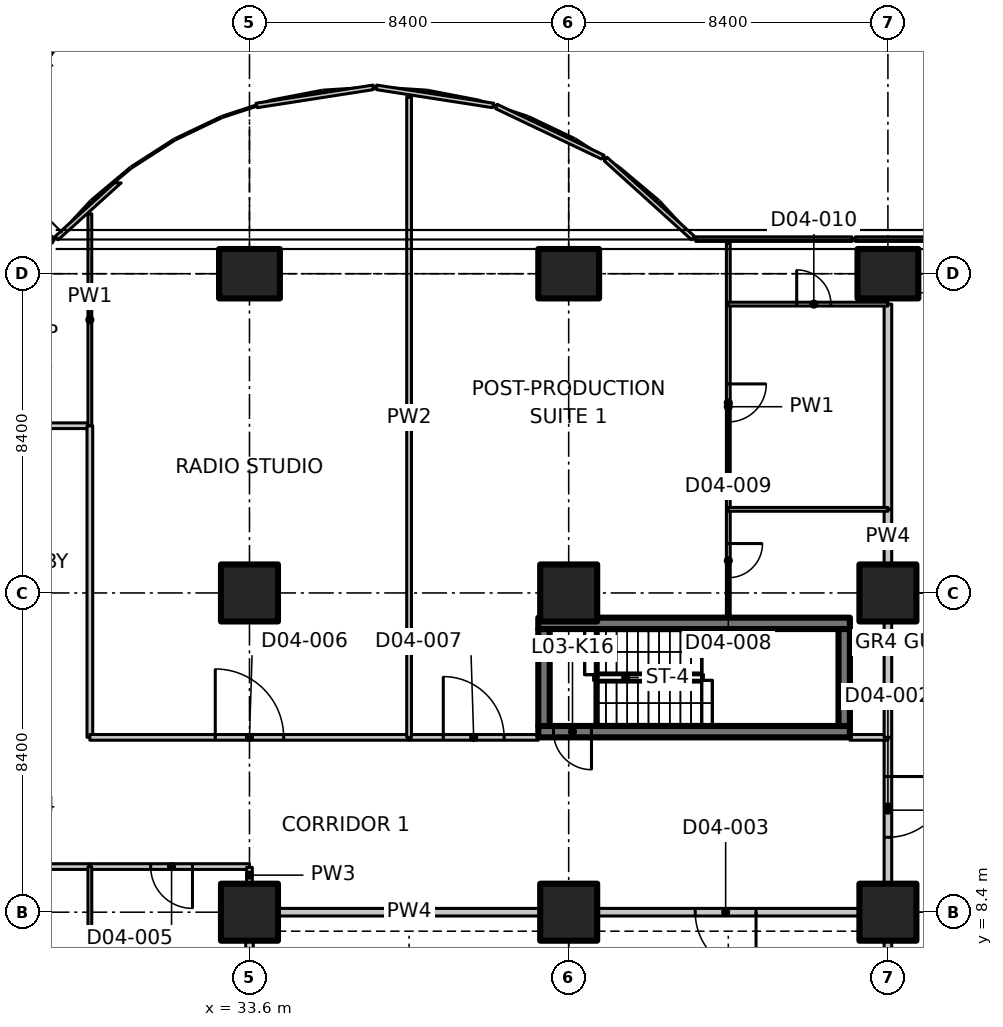
"""IFC4 building model, lengths in metres.
Left out: names, types, materials, properties, quantities, classifications, styles, units other than length and angle.
Written with IfcOpenShell. Run it as: python <this file> out.ifc"""

import sys

from ifc_helpers import new_model, si_unit, direction, frame, frame_2d, origin, origin_2d, place, context, subcontext, project, spatial, polyline, rectangle, outline, extrude, element, fill, save


model = new_model("IFC4")
c1 = context("Model", 3, precision=1e-05, world=origin(), true_north=direction((0.0, 1.0)))
c2 = subcontext(c1, "Body", "Model", "MODEL_VIEW")
j1 = project(units=[si_unit("LENGTHUNIT", "METRE"), si_unit("PLANEANGLEUNIT", "RADIAN")], contexts=[c1])
p1 = place(None, origin())
s1 = spatial("IfcSite", under=j1, at=p1, CompositionType="ELEMENT")
p2 = place(p1, origin())
s2 = spatial("IfcBuilding", under=s1, at=p2, CompositionType="ELEMENT")
p3 = place(p2, frame((0.0, 0.0, 20.0)))
s3 = spatial("IfcBuildingStorey", under=s2, at=p3, CompositionType="ELEMENT", Elevation=20.0)
for number, where, z_axis, x_axis in (
    (1, (33.6, 8.4, 0.0), (0.0, 0.0, 1.0), (1.0, 0.0, 0.0)),
    (2, (33.6, 16.8, 0.0), (0.0, 0.0, 1.0), (1.0, 0.0, 0.0)),
):
    element("IfcColumn", number, at=place(p3, frame(where, z_axis=z_axis, x_axis=x_axis)), inside=s3, PredefinedType="COLUMN", context=c2, shape_type="SweptSolid", body=[
        extrude(rectangle(XDim=1.5, YDim=1.5, at=origin_2d()), origin(), (0.0, 0.0, 1.0), 7.25),
    ])
p4 = place(p3, frame((33.6, 25.2, 0.0), z_axis=(0.0, 0.0, 1.0), x_axis=(0.0, 1.0, 0.0)))
e3 = element("IfcColumn", 3, at=p4, inside=s3, PredefinedType="COLUMN", context=c2, shape_type="SweptSolid", body=[
    extrude(rectangle(XDim=1.3, YDim=1.6, at=origin_2d()), origin(), (0.0, 0.0, 1.0), 7.25),
])
for number, where, z_axis, x_axis in (
    (4, (42.0, 8.4, 0.0), (0.0, 0.0, 1.0), (1.0, 0.0, 0.0)),
    (5, (42.0, 16.8, 0.0), (0.0, 0.0, 1.0), (1.0, 0.0, 0.0)),
):
    element("IfcColumn", number, at=place(p3, frame(where, z_axis=z_axis, x_axis=x_axis)), inside=s3, PredefinedType="COLUMN", context=c2, shape_type="SweptSolid", body=[
        extrude(rectangle(XDim=1.5, YDim=1.5, at=origin_2d()), origin(), (0.0, 0.0, 1.0), 7.25),
    ])
p5 = place(p3, frame((42.0, 25.2, 0.0), z_axis=(0.0, 0.0, 1.0), x_axis=(0.0, 1.0, 0.0)))
e6 = element("IfcColumn", 6, at=p5, inside=s3, PredefinedType="COLUMN", context=c2, shape_type="SweptSolid", body=[
    extrude(rectangle(XDim=1.3, YDim=1.6, at=origin_2d()), origin(), (0.0, 0.0, 1.0), 7.25),
])
for number, where, z_axis, x_axis in (
    (7, (50.4, 8.4, 0.0), (0.0, 0.0, 1.0), (1.0, 0.0, 0.0)),
    (8, (50.4, 16.8, 0.0), (0.0, 0.0, 1.0), (1.0, 0.0, 0.0)),
):
    element("IfcColumn", number, at=place(p3, frame(where, z_axis=z_axis, x_axis=x_axis)), inside=s3, PredefinedType="COLUMN", context=c2, shape_type="SweptSolid", body=[
        extrude(rectangle(XDim=1.5, YDim=1.5, at=origin_2d()), origin(), (0.0, 0.0, 1.0), 7.25),
    ])
p6 = place(p3, frame((50.4, 25.2, 0.0), z_axis=(0.0, 0.0, 1.0), x_axis=(0.0, 1.0, 0.0)))
e9 = element("IfcColumn", 9, at=p6, inside=s3, PredefinedType="COLUMN", context=c2, shape_type="SweptSolid", body=[
    extrude(rectangle(XDim=1.3, YDim=1.6, at=origin_2d()), origin(), (0.0, 0.0, 1.0), 7.25),
])
p7 = place(p3, origin())
e10 = element("IfcWall", 10, at=p7, inside=s3, PredefinedType="SOLIDWALL", context=c2, shape_type="SweptSolid", body=[
    extrude(outline(polyline([(49.545, 26.17), (49.545, 26.05), (53.655, 26.05), (53.655, 26.17), (49.545, 26.17)])), origin(), (0.0, 0.0, 1.0), 7.5),
])
p8 = place(p3, origin())
e11 = element("IfcWall", 11, at=p8, inside=s3, PredefinedType="SOLIDWALL", context=c2, shape_type="SweptSolid", body=[
    extrude(outline(polyline([(45.345, 26.17), (45.345, 26.05), (49.455, 26.05), (49.455, 26.17), (45.345, 26.17)])), origin(), (0.0, 0.0, 1.0), 7.5),
])
p9 = place(p3, origin())
e12 = element("IfcWall", 12, at=p9, inside=s3, PredefinedType="SOLIDWALL", context=c2, shape_type="SweptSolid", body=[
    extrude(outline(polyline([(45.233, 26.093), (45.313, 26.182), (43.005, 28.267), (42.938, 28.167), (45.233, 26.093)])), origin(), (0.0, 0.0, 1.0), 7.5),
])
p10 = place(p3, origin())
e13 = element("IfcWall", 13, at=p10, inside=s3, PredefinedType="SOLIDWALL", context=c2, shape_type="SweptSolid", body=[
    extrude(outline(polyline([(42.863, 28.217), (42.93, 28.317), (40.115, 29.658), (40.079, 29.542), (42.863, 28.217)])), origin(), (0.0, 0.0, 1.0), 7.5),
])
p11 = place(p3, origin())
e14 = element("IfcWall", 14, at=p11, inside=s3, PredefinedType="SOLIDWALL", context=c2, shape_type="SweptSolid", body=[
    extrude(outline(polyline([(39.993, 29.569), (40.029, 29.685), (36.945, 30.164), (36.945, 30.042), (39.993, 29.569)])), origin(), (0.0, 0.0, 1.0), 7.5),
])
p12 = place(p3, origin())
e15 = element("IfcWall", 15, at=p12, inside=s3, PredefinedType="SOLIDWALL", context=c2, shape_type="SweptSolid", body=[
    extrude(outline(polyline([(36.855, 30.042), (36.855, 30.164), (33.771, 29.685), (33.807, 29.569), (36.855, 30.042)])), origin(), (0.0, 0.0, 1.0), 7.5),
])
p13 = place(p3, origin())
e16 = element("IfcWall", 16, at=p13, inside=s3, PredefinedType="SOLIDWALL", context=c2, shape_type="SweptSolid", body=[
    extrude(outline(polyline([(30.224, 27.59), (30.045, 27.59), (28.487, 26.182), (28.567, 26.093), (30.224, 27.59)])), origin(), (0.0, 0.0, 1.0), 7.5),
])
p14 = place(p3, origin())
e17 = element("IfcWall", 17, at=p14, inside=s3, PredefinedType="SOLIDWALL", context=c2, shape_type="SweptSolid", body=[
    extrude(outline(polyline([(28.412, 26.005), (28.458, 26.116), (26.847, 26.783), (26.755, 26.692), (28.412, 26.005)])), origin(), (0.0, 0.0, 1.0), 7.5),
])
p15 = place(p3, frame((49.4, 13.15, 0.0), z_axis=(0.0, 0.0, 1.0), x_axis=(-1.0, 0.0, 0.0)))
e18 = element("IfcWall", 18, at=p15, inside=s3, PredefinedType="SHEAR", context=c2, shape_type="SweptSolid", body=[
    extrude(rectangle(XDim=8.2, YDim=0.3, at=frame_2d((4.1, 0.0))), origin(), (0.0, 0.0, 1.0), 7.25),
])
p16 = place(p15, frame((6.8, 0.0, 0.0)))
e19 = element("IfcOpeningElement", 19, at=p16, cuts=e18, PredefinedType="OPENING", context=c2, shape_type="SweptSolid", body=[
    extrude(rectangle(XDim=1.0, YDim=2.1, at=frame_2d((0.5, 1.05))), frame((0.0, 0.16, 0.0), z_axis=(0.0, -1.0, 0.0), x_axis=(1.0, 0.0, 0.0)), (0.0, 0.0, 1.0), 0.32),
])
p17 = place(p3, frame((41.2, 16.0, 0.0), z_axis=(0.0, 0.0, 1.0), x_axis=(1.0, 0.0, 0.0)))
e20 = element("IfcWall", 20, at=p17, inside=s3, PredefinedType="SHEAR", context=c2, shape_type="SweptSolid", body=[
    extrude(rectangle(XDim=8.2, YDim=0.3, at=frame_2d((4.1, 0.0))), origin(), (0.0, 0.0, 1.0), 7.25),
])
for number, where, z_axis, x_axis in (
    (21, (41.35, 13.3, 0.0), (0.0, 0.0, 1.0), (0.0, 1.0, 0.0)),
    (22, (49.25, 13.3, 0.0), (0.0, 0.0, 1.0), (0.0, 1.0, 0.0)),
):
    element("IfcWall", number, at=place(p3, frame(where, z_axis=z_axis, x_axis=x_axis)), inside=s3, PredefinedType="SHEAR", context=c2, shape_type="SweptSolid", body=[
        extrude(rectangle(XDim=2.55, YDim=0.3, at=frame_2d((1.275, 0.0))), origin(), (0.0, 0.0, 1.0), 7.25),
    ])
p18 = place(p3, frame((25.2, 21.2, 0.0), z_axis=(0.0, 0.0, 1.0), x_axis=(1.0, 0.0, 0.0)))
e23 = element("IfcWall", 23, at=p18, inside=s3, PredefinedType="PARTITIONING", context=c2, shape_type="SweptSolid", body=[
    extrude(rectangle(XDim=4.2, YDim=0.15, at=frame_2d((2.1, 0.0))), origin(), (0.0, 0.0, 1.0), 7.23),
])
p19 = place(p3, frame((29.4, 9.6, 0.0), z_axis=(0.0, 0.0, 1.0), x_axis=(-1.0, 0.0, 0.0)))
e24 = element("IfcWall", 24, at=p19, inside=s3, PredefinedType="PARTITIONING", context=c2, shape_type="SweptSolid", body=[
    extrude(rectangle(XDim=4.2, YDim=0.15, at=frame_2d((2.1, 0.0))), origin(), (0.0, 0.0, 1.0), 7.23),
])
p20 = place(p19, frame((1.5, 0.0, 0.0)))
e25 = element("IfcOpeningElement", 25, at=p20, cuts=e24, PredefinedType="OPENING", context=c2, shape_type="SweptSolid", body=[
    extrude(rectangle(XDim=1.1, YDim=2.1, at=frame_2d((0.55, 1.05))), frame((0.0, 0.085, 0.0), z_axis=(0.0, -1.0, 0.0), x_axis=(1.0, 0.0, 0.0)), (0.0, 0.0, 1.0), 0.17),
])
p21 = place(p3, frame((29.4, 21.2, 0.0), z_axis=(0.0, 0.0, 1.0), x_axis=(0.0, -1.0, 0.0)))
e26 = element("IfcWall", 26, at=p21, inside=s3, PredefinedType="PARTITIONING", context=c2, shape_type="SweptSolid", body=[
    extrude(rectangle(XDim=8.2, YDim=0.15, at=frame_2d((4.1, 0.0))), origin(), (0.0, 0.0, 1.0), 7.23),
])
p22 = place(p3, frame((29.4, 26.776, 0.0), z_axis=(0.0, 0.0, 1.0), x_axis=(0.0, -1.0, 0.0)))
e27 = element("IfcWall", 27, at=p22, inside=s3, PredefinedType="PARTITIONING", context=c2, shape_type="SweptSolid", body=[
    extrude(outline(polyline([(0.0, 0.0), (5.576, 0.0), (5.576, 7.23), (2.026, 7.23), (2.024, 6.88), (1.128, 6.88), (1.126, 7.23), (0.0, 7.23), (0.0, 0.0)])), frame((0.0, 0.05, 0.0), z_axis=(0.0, -1.0, 0.0), x_axis=(1.0, 0.0, 0.0)), (0.0, 0.0, 1.0), 0.1),
])
p23 = place(p3, frame((28.432, 31.168, 0.0), z_axis=(0.0, 0.0, 1.0), x_axis=(-0.541288698077, -0.840836812547, 0.0)))
e28 = element("IfcWall", 28, at=p23, inside=s3, PredefinedType="PARTITIONING", context=c2, shape_type="SweptSolid", body=[
    extrude(rectangle(XDim=0.325, YDim=0.15, at=frame_2d((0.163, 0.0))), origin(), (0.0, 0.0, 1.0), 7.23),
])
p24 = place(p3, frame((50.4, 13.0, 0.0), z_axis=(0.0, 0.0, 1.0), x_axis=(0.0, -1.0, 0.0)))
e29 = element("IfcWall", 29, at=p24, inside=s3, PredefinedType="PARTITIONING", context=c2, shape_type="SweptSolid", body=[
    extrude(rectangle(XDim=3.83, YDim=0.2, at=frame_2d((1.915, 0.0))), origin(), (0.0, 0.0, 1.0), 7.23),
])
p25 = place(p24, frame((1.03, 0.0, 0.0)))
e30 = element("IfcOpeningElement", 30, at=p25, cuts=e29, PredefinedType="OPENING", context=c2, shape_type="SweptSolid", body=[
    extrude(rectangle(XDim=1.6, YDim=2.1, at=frame_2d((0.8, 1.05))), frame((0.0, 0.11, 0.0), z_axis=(0.0, -1.0, 0.0), x_axis=(1.0, 0.0, 0.0)), (0.0, 0.0, 1.0), 0.22),
])
p26 = place(p3, frame((49.63, 8.4, 0.0), z_axis=(0.0, 0.0, 1.0), x_axis=(-1.0, 0.0, 0.0)))
e31 = element("IfcWall", 31, at=p26, inside=s3, PredefinedType="PARTITIONING", context=c2, shape_type="SweptSolid", body=[
    extrude(rectangle(XDim=6.86, YDim=0.2, at=frame_2d((3.43, 0.0))), origin(), (0.0, 0.0, 1.0), 7.23),
])
p27 = place(p26, frame((2.7, 0.0, 0.0)))
e32 = element("IfcOpeningElement", 32, at=p27, cuts=e31, PredefinedType="OPENING", context=c2, shape_type="SweptSolid", body=[
    extrude(rectangle(XDim=1.6, YDim=2.1, at=frame_2d((0.8, 1.05))), frame((0.0, 0.11, 0.0), z_axis=(0.0, -1.0, 0.0), x_axis=(1.0, 0.0, 0.0)), (0.0, 0.0, 1.0), 0.22),
])
p28 = place(p3, frame((41.23, 8.4, 0.0), z_axis=(0.0, 0.0, 1.0), x_axis=(-1.0, 0.0, 0.0)))
e33 = element("IfcWall", 33, at=p28, inside=s3, PredefinedType="PARTITIONING", context=c2, shape_type="SweptSolid", body=[
    extrude(rectangle(XDim=6.86, YDim=0.2, at=frame_2d((3.43, 0.0))), origin(), (0.0, 0.0, 1.0), 7.23),
])
p29 = place(p3, frame((33.6, 9.6, 0.0), z_axis=(0.0, 0.0, 1.0), x_axis=(-1.0, 0.0, 0.0)))
e34 = element("IfcWall", 34, at=p29, inside=s3, PredefinedType="PARTITIONING", context=c2, shape_type="SweptSolid", body=[
    extrude(rectangle(XDim=4.2, YDim=0.15, at=frame_2d((2.1, 0.0))), origin(), (0.0, 0.0, 1.0), 7.23),
])
p30 = place(p29, frame((1.5, 0.0, 0.0)))
e35 = element("IfcOpeningElement", 35, at=p30, cuts=e34, PredefinedType="OPENING", context=c2, shape_type="SweptSolid", body=[
    extrude(rectangle(XDim=1.1, YDim=2.1, at=frame_2d((0.55, 1.05))), frame((0.0, 0.085, 0.0), z_axis=(0.0, -1.0, 0.0), x_axis=(1.0, 0.0, 0.0)), (0.0, 0.0, 1.0), 0.17),
])
p31 = place(p3, frame((33.6, 9.17, 0.0), z_axis=(0.0, 0.0, 1.0), x_axis=(0.0, 1.0, 0.0)))
e36 = element("IfcWall", 36, at=p31, inside=s3, PredefinedType="PARTITIONING", context=c2, shape_type="SweptSolid", body=[
    extrude(rectangle(XDim=0.41, YDim=0.15, at=frame_2d((0.205, 0.0))), origin(), (0.0, 0.0, 1.0), 7.23),
])
p32 = place(p3, frame((29.4, 13.0, 0.0), z_axis=(0.0, 0.0, 1.0), x_axis=(1.0, 0.0, 0.0)))
e37 = element("IfcWall", 37, at=p32, inside=s3, PredefinedType="PARTITIONING", context=c2, shape_type="SweptSolid", body=[
    extrude(rectangle(XDim=8.4, YDim=0.15, at=frame_2d((4.2, 0.0))), origin(), (0.0, 0.0, 1.0), 7.23),
])
p33 = place(p32, frame((3.3, 0.0, 0.0)))
e38 = element("IfcOpeningElement", 38, at=p33, cuts=e37, PredefinedType="OPENING", context=c2, shape_type="SweptSolid", body=[
    extrude(rectangle(XDim=1.8, YDim=2.1, at=frame_2d((0.9, 1.05))), frame((0.0, 0.085, 0.0), z_axis=(0.0, -1.0, 0.0), x_axis=(1.0, 0.0, 0.0)), (0.0, 0.0, 1.0), 0.17),
])
p34 = place(p3, frame((37.8, 13.0, 0.0), z_axis=(0.0, 0.0, 1.0), x_axis=(1.0, 0.0, 0.0)))
e39 = element("IfcWall", 39, at=p34, inside=s3, PredefinedType="PARTITIONING", context=c2, shape_type="SweptSolid", body=[
    extrude(rectangle(XDim=3.4, YDim=0.15, at=frame_2d((1.7, 0.0))), origin(), (0.0, 0.0, 1.0), 7.23),
])
p35 = place(p34, frame((0.9, 0.0, 0.0)))
e40 = element("IfcOpeningElement", 40, at=p35, cuts=e39, PredefinedType="OPENING", context=c2, shape_type="SweptSolid", body=[
    extrude(rectangle(XDim=1.6, YDim=2.1, at=frame_2d((0.8, 1.05))), frame((0.0, 0.085, 0.0), z_axis=(0.0, -1.0, 0.0), x_axis=(1.0, 0.0, 0.0)), (0.0, 0.0, 1.0), 0.17),
])
p36 = place(p3, frame((49.4, 13.0, 0.0), z_axis=(0.0, 0.0, 1.0), x_axis=(1.0, 0.0, 0.0)))
e41 = element("IfcWall", 41, at=p36, inside=s3, PredefinedType="PARTITIONING", context=c2, shape_type="SweptSolid", body=[
    extrude(rectangle(XDim=1.0, YDim=0.15, at=frame_2d((0.5, 0.0))), origin(), (0.0, 0.0, 1.0), 7.23),
])
p37 = place(p3, frame((50.4, 0.67, 0.0), z_axis=(0.0, 0.0, 1.0), x_axis=(0.0, 1.0, 0.0)))
e42 = element("IfcWall", 42, at=p37, inside=s3, PredefinedType="PARTITIONING", context=c2, shape_type="SweptSolid", body=[
    extrude(rectangle(XDim=6.96, YDim=0.2, at=frame_2d((3.48, 0.0))), origin(), (0.0, 0.0, 1.0), 7.23),
])
p38 = place(p3, frame((50.4, 13.0, 0.0), z_axis=(0.0, 0.0, 1.0), x_axis=(0.0, 1.0, 0.0)))
e43 = element("IfcWall", 43, at=p38, inside=s3, PredefinedType="PARTITIONING", context=c2, shape_type="SweptSolid", body=[
    extrude(rectangle(XDim=3.03, YDim=0.2, at=frame_2d((1.515, 0.0))), origin(), (0.0, 0.0, 1.0), 7.23),
])
p39 = place(p3, frame((50.4, 17.57, 0.0), z_axis=(0.0, 0.0, 1.0), x_axis=(0.0, 1.0, 0.0)))
e44 = element("IfcWall", 44, at=p39, inside=s3, PredefinedType="PARTITIONING", context=c2, shape_type="SweptSolid", body=[
    extrude(rectangle(XDim=1.43, YDim=0.2, at=frame_2d((0.715, 0.0))), origin(), (0.0, 0.0, 1.0), 7.23),
])
p40 = place(p3, frame((50.4, 19.0, 0.0), z_axis=(0.0, 0.0, 1.0), x_axis=(0.0, 1.0, 0.0)))
e45 = element("IfcWall", 45, at=p40, inside=s3, PredefinedType="PARTITIONING", context=c2, shape_type="SweptSolid", body=[
    extrude(rectangle(XDim=5.4, YDim=0.2, at=frame_2d((2.7, 0.0))), origin(), (0.0, 0.0, 1.0), 7.23),
])
p41 = place(p3, frame((33.6, 0.67, 0.0), z_axis=(0.0, 0.0, 1.0), x_axis=(0.0, 1.0, 0.0)))
e46 = element("IfcWall", 46, at=p41, inside=s3, PredefinedType="PARTITIONING", context=c2, shape_type="SweptSolid", body=[
    extrude(rectangle(XDim=6.96, YDim=0.2, at=frame_2d((3.48, 0.0))), origin(), (0.0, 0.0, 1.0), 7.23),
])
p42 = place(p3, frame((29.4, 9.6, 0.0), z_axis=(0.0, 0.0, 1.0), x_axis=(0.0, -1.0, 0.0)))
e47 = element("IfcWall", 47, at=p42, inside=s3, PredefinedType="PARTITIONING", context=c2, shape_type="SweptSolid", body=[
    extrude(outline(polyline([(0.0, 0.0), (10.398, 0.0), (10.398, 7.23), (10.05, 7.23), (10.048, 6.88), (9.152, 6.88), (9.15, 7.23), (0.0, 7.23), (0.0, 0.0)])), frame((0.0, 0.05, 0.0), z_axis=(0.0, -1.0, 0.0), x_axis=(1.0, 0.0, 0.0)), (0.0, 0.0, 1.0), 0.1),
])
p43 = place(p3, frame((37.8, 29.844, 0.0), z_axis=(0.0, 0.0, 1.0), x_axis=(0.0, -1.0, 0.0)))
e48 = element("IfcWall", 48, at=p43, inside=s3, PredefinedType="PARTITIONING", context=c2, shape_type="SweptSolid", body=[
    extrude(outline(polyline([(0.0, 0.0), (16.844, 0.0), (16.844, 7.23), (5.094, 7.23), (5.092, 6.88), (4.196, 6.88), (4.194, 7.23), (0.0, 7.23), (0.0, 0.0)])), frame((0.0, 0.062, 0.0), z_axis=(0.0, -1.0, 0.0), x_axis=(1.0, 0.0, 0.0)), (0.0, 0.0, 1.0), 0.125),
])
p44 = place(p3, frame((46.2, 19.0, 0.0), z_axis=(0.0, 0.0, 1.0), x_axis=(0.0, -1.0, 0.0)))
e49 = element("IfcWall", 49, at=p44, inside=s3, PredefinedType="PARTITIONING", context=c2, shape_type="SweptSolid", body=[
    extrude(rectangle(XDim=2.85, YDim=0.1, at=frame_2d((1.425, 0.0))), origin(), (0.0, 0.0, 1.0), 7.23),
])
p45 = place(p44, frame((0.9, 0.0, 0.0)))
e50 = element("IfcOpeningElement", 50, at=p45, cuts=e49, PredefinedType="OPENING", context=c2, shape_type="SweptSolid", body=[
    extrude(rectangle(XDim=0.9, YDim=2.1, at=frame_2d((0.45, 1.05))), frame((0.0, 0.06, 0.0), z_axis=(0.0, -1.0, 0.0), x_axis=(1.0, 0.0, 0.0)), (0.0, 0.0, 1.0), 0.12),
])
p46 = place(p3, frame((46.2, 24.4, 0.0), z_axis=(0.0, 0.0, 1.0), x_axis=(0.0, -1.0, 0.0)))
e51 = element("IfcWall", 51, at=p46, inside=s3, PredefinedType="PARTITIONING", context=c2, shape_type="SweptSolid", body=[
    extrude(rectangle(XDim=5.4, YDim=0.1, at=frame_2d((2.7, 0.0))), origin(), (0.0, 0.0, 1.0), 7.23),
])
p47 = place(p46, frame((2.1, 0.0, 0.0)))
e52 = element("IfcOpeningElement", 52, at=p47, cuts=e51, PredefinedType="OPENING", context=c2, shape_type="SweptSolid", body=[
    extrude(rectangle(XDim=1.0, YDim=2.1, at=frame_2d((0.5, 1.05))), frame((0.0, 0.06, 0.0), z_axis=(0.0, -1.0, 0.0), x_axis=(1.0, 0.0, 0.0)), (0.0, 0.0, 1.0), 0.12),
])
p48 = place(p3, frame((46.2, 25.998, 0.0), z_axis=(0.0, 0.0, 1.0), x_axis=(0.0, -1.0, 0.0)))
e53 = element("IfcWall", 53, at=p48, inside=s3, PredefinedType="PARTITIONING", context=c2, shape_type="SweptSolid", body=[
    extrude(rectangle(XDim=1.598, YDim=0.1, at=frame_2d((0.799, 0.0))), origin(), (0.0, 0.0, 1.0), 6.88),
])
p49 = place(p3, frame((46.2, 19.0, 0.0), z_axis=(0.0, 0.0, 1.0), x_axis=(1.0, 0.0, 0.0)))
e54 = element("IfcWall", 54, at=p49, inside=s3, PredefinedType="PARTITIONING", context=c2, shape_type="SweptSolid", body=[
    extrude(rectangle(XDim=4.2, YDim=0.1, at=frame_2d((2.1, 0.0))), origin(), (0.0, 0.0, 1.0), 7.23),
])
p50 = place(p3, frame((46.2, 24.4, 0.0), z_axis=(0.0, 0.0, 1.0), x_axis=(1.0, 0.0, 0.0)))
e55 = element("IfcWall", 55, at=p50, inside=s3, PredefinedType="PARTITIONING", context=c2, shape_type="SweptSolid", body=[
    extrude(rectangle(XDim=4.2, YDim=0.1, at=frame_2d((2.1, 0.0))), origin(), (0.0, 0.0, 1.0), 7.23),
])
p51 = place(p50, frame((1.8, 0.0, 0.0)))
e56 = element("IfcOpeningElement", 56, at=p51, cuts=e55, PredefinedType="OPENING", context=c2, shape_type="SweptSolid", body=[
    extrude(rectangle(XDim=0.9, YDim=2.1, at=frame_2d((0.45, 1.05))), frame((0.0, 0.06, 0.0), z_axis=(0.0, -1.0, 0.0), x_axis=(1.0, 0.0, 0.0)), (0.0, 0.0, 1.0), 0.12),
])
p52 = place(p16, origin())
e57 = element("IfcDoor", 57, at=p52, inside=s3, OperationType="SINGLE_SWING_LEFT", PredefinedType="DOOR", context=c2, shape_type="SweptSolid", body=[
    extrude(rectangle(XDim=1.0, YDim=2.1, at=frame_2d((0.5, 1.05))), frame((0.0, 0.025, 0.0), z_axis=(0.0, -1.0, 0.0), x_axis=(1.0, 0.0, 0.0)), (0.0, 0.0, 1.0), 0.05),
])
fill(e19, e57)
p53 = place(p25, origin())
e58 = element("IfcDoor", 58, at=p53, inside=s3, OperationType="DOUBLE_DOOR_SINGLE_SWING", PredefinedType="DOOR", context=c2, shape_type="SweptSolid", body=[
    extrude(rectangle(XDim=1.6, YDim=2.1, at=frame_2d((0.8, 1.05))), frame((0.0, 0.025, 0.0), z_axis=(0.0, -1.0, 0.0), x_axis=(1.0, 0.0, 0.0)), (0.0, 0.0, 1.0), 0.05),
])
fill(e30, e58)
p54 = place(p27, origin())
e59 = element("IfcDoor", 59, at=p54, inside=s3, OperationType="DOUBLE_DOOR_SINGLE_SWING", PredefinedType="DOOR", context=c2, shape_type="SweptSolid", body=[
    extrude(rectangle(XDim=1.6, YDim=2.1, at=frame_2d((0.8, 1.05))), frame((0.0, 0.025, 0.0), z_axis=(0.0, -1.0, 0.0), x_axis=(1.0, 0.0, 0.0)), (0.0, 0.0, 1.0), 0.05),
])
fill(e32, e59)
p55 = place(p30, origin())
e60 = element("IfcDoor", 60, at=p55, inside=s3, OperationType="SINGLE_SWING_LEFT", PredefinedType="DOOR", context=c2, shape_type="SweptSolid", body=[
    extrude(rectangle(XDim=1.1, YDim=2.1, at=frame_2d((0.55, 1.05))), frame((0.0, 0.025, 0.0), z_axis=(0.0, -1.0, 0.0), x_axis=(1.0, 0.0, 0.0)), (0.0, 0.0, 1.0), 0.05),
])
fill(e35, e60)
p56 = place(p33, origin())
e61 = element("IfcDoor", 61, at=p56, inside=s3, OperationType="DOUBLE_DOOR_SINGLE_SWING", PredefinedType="DOOR", context=c2, shape_type="SweptSolid", body=[
    extrude(rectangle(XDim=1.8, YDim=2.1, at=frame_2d((0.9, 1.05))), frame((0.0, 0.025, 0.0), z_axis=(0.0, -1.0, 0.0), x_axis=(1.0, 0.0, 0.0)), (0.0, 0.0, 1.0), 0.05),
])
fill(e38, e61)
p57 = place(p35, origin())
e62 = element("IfcDoor", 62, at=p57, inside=s3, OperationType="DOUBLE_DOOR_SINGLE_SWING", PredefinedType="DOOR", context=c2, shape_type="SweptSolid", body=[
    extrude(rectangle(XDim=1.6, YDim=2.1, at=frame_2d((0.8, 1.05))), frame((0.0, 0.025, 0.0), z_axis=(0.0, -1.0, 0.0), x_axis=(1.0, 0.0, 0.0)), (0.0, 0.0, 1.0), 0.05),
])
fill(e40, e62)
p58 = place(p45, origin())
e63 = element("IfcDoor", 63, at=p58, inside=s3, OperationType="SINGLE_SWING_LEFT", PredefinedType="DOOR", context=c2, shape_type="SweptSolid", body=[
    extrude(rectangle(XDim=0.9, YDim=2.1, at=frame_2d((0.45, 1.05))), frame((0.0, 0.025, 0.0), z_axis=(0.0, -1.0, 0.0), x_axis=(1.0, 0.0, 0.0)), (0.0, 0.0, 1.0), 0.05),
])
fill(e50, e63)
p59 = place(p47, origin())
e64 = element("IfcDoor", 64, at=p59, inside=s3, OperationType="SINGLE_SWING_LEFT", PredefinedType="DOOR", context=c2, shape_type="SweptSolid", body=[
    extrude(rectangle(XDim=1.0, YDim=2.1, at=frame_2d((0.5, 1.05))), frame((0.0, 0.025, 0.0), z_axis=(0.0, -1.0, 0.0), x_axis=(1.0, 0.0, 0.0)), (0.0, 0.0, 1.0), 0.05),
])
fill(e52, e64)
p60 = place(p51, origin())
e65 = element("IfcDoor", 65, at=p60, inside=s3, OperationType="SINGLE_SWING_LEFT", PredefinedType="DOOR", context=c2, shape_type="SweptSolid", body=[
    extrude(rectangle(XDim=0.9, YDim=2.1, at=frame_2d((0.45, 1.05))), frame((0.0, 0.025, 0.0), z_axis=(0.0, -1.0, 0.0), x_axis=(1.0, 0.0, 0.0)), (0.0, 0.0, 1.0), 0.05),
])
fill(e56, e65)
save(model, sys.argv[1])
